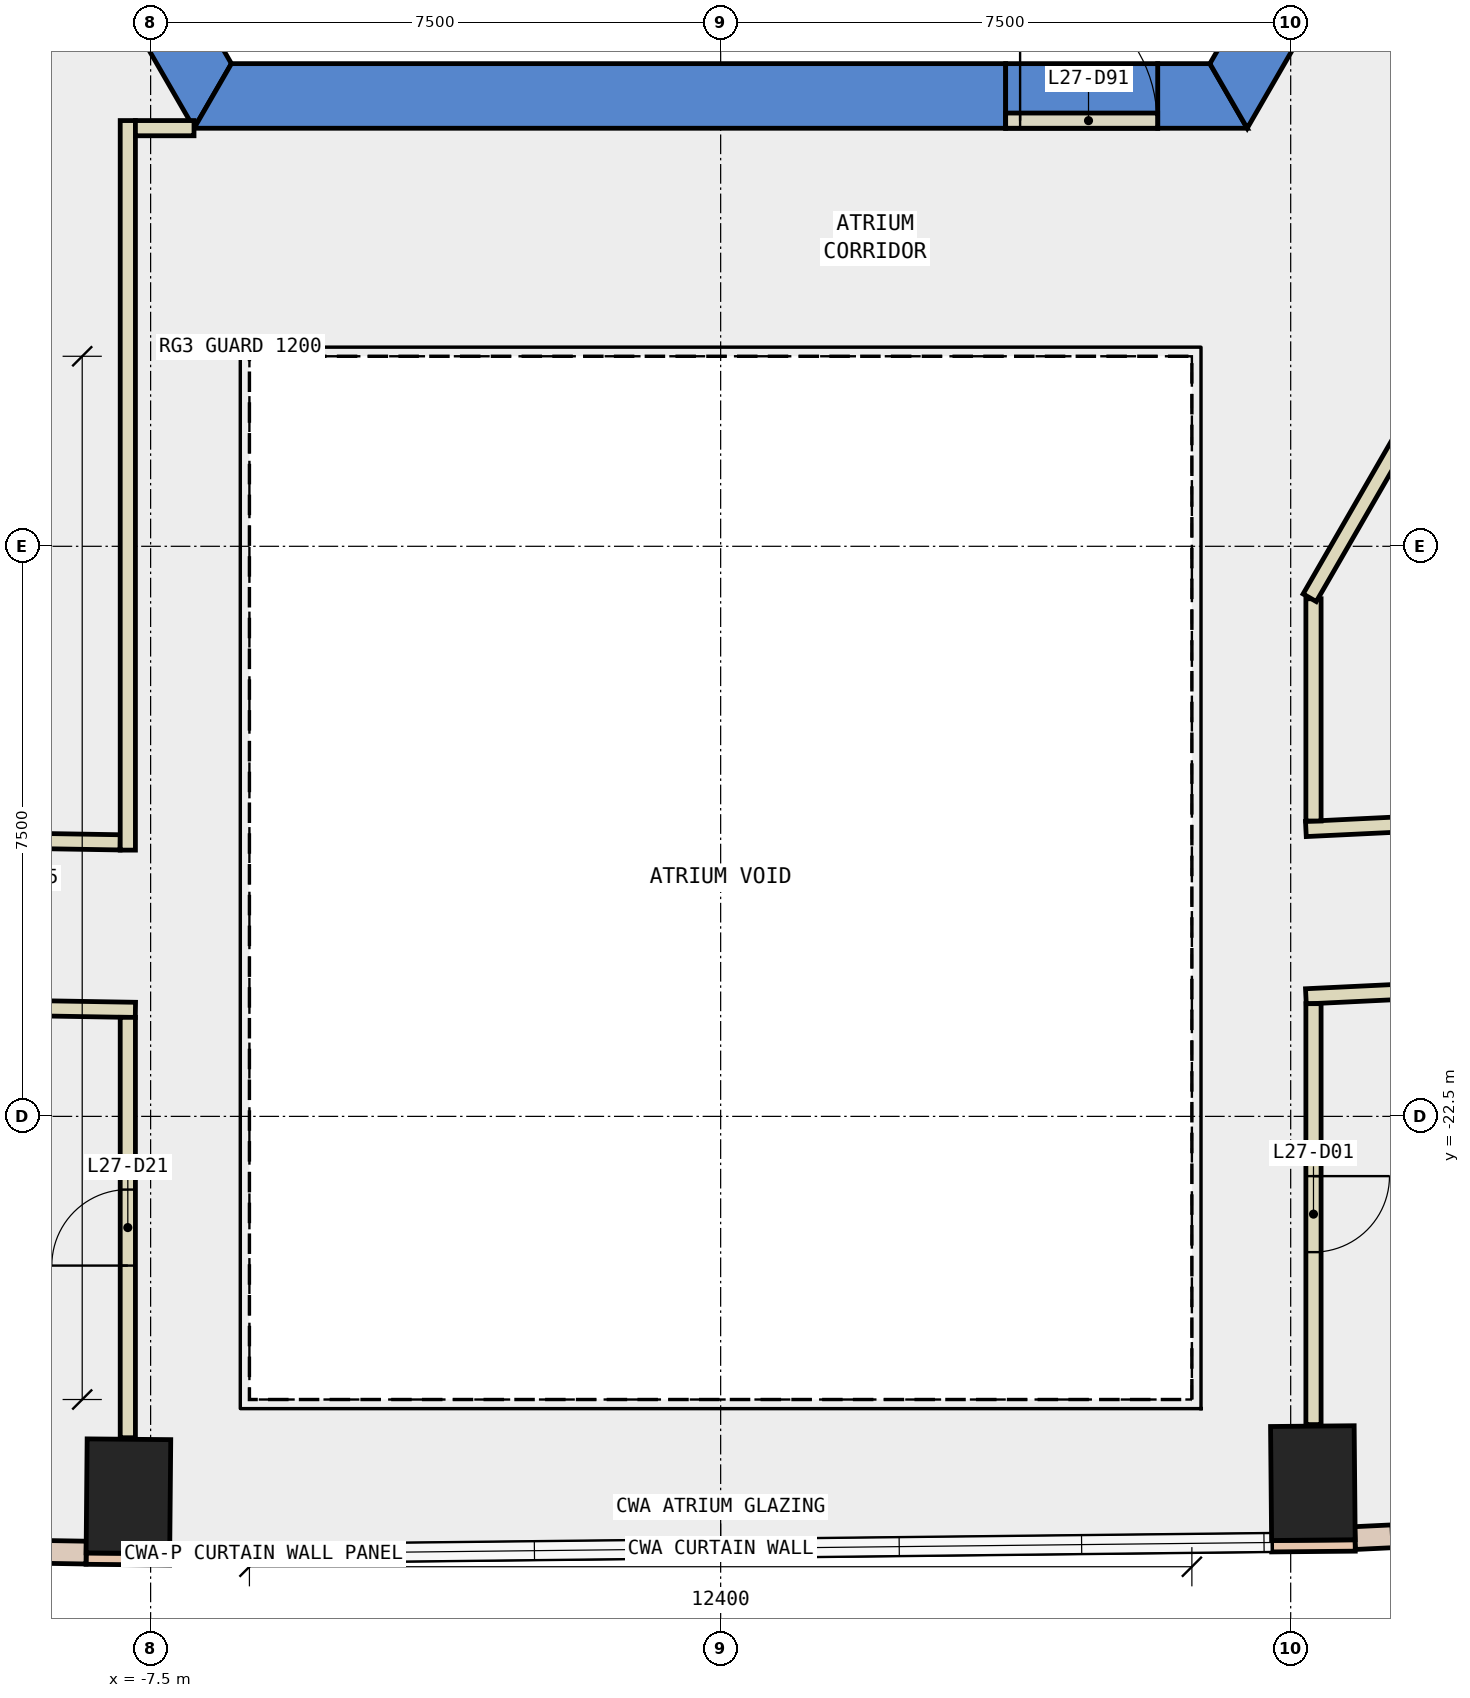
"""IFC4 building model, lengths in metres.
Left out: names, types, materials, properties, quantities, classifications, styles, units other than length and angle.
Written with IfcOpenShell. Run it as: python <this file> out.ifc"""

import sys

from ifc_helpers import new_model, si_unit, direction, frame, frame_2d, origin, origin_2d, place, context, subcontext, project, spatial, polyline, rectangle, outline, extrude, element, fill, save


model = new_model("IFC4")
c1 = context("Model", 3, precision=1e-05, world=origin(), true_north=direction((0.0, 1.0)))
c2 = subcontext(c1, "Body", "Model", "MODEL_VIEW")
j1 = project(units=[si_unit("LENGTHUNIT", "METRE"), si_unit("PLANEANGLEUNIT", "RADIAN")], contexts=[c1])
p1 = place(None, origin())
s1 = spatial("IfcSite", under=j1, at=p1, CompositionType="ELEMENT")
p2 = place(p1, origin())
s2 = spatial("IfcBuilding", under=s1, at=p2, CompositionType="ELEMENT")
p3 = place(p2, frame((0.0, 0.0, 124.4)))
s3 = spatial("IfcBuildingStorey", under=s2, at=p3, CompositionType="ELEMENT", Elevation=124.4)
for number, where, z_axis, x_axis in (
    (1, (-7.792, -27.498, -0.4), (0.0, 0.0, 1.0), (-1.0, 0.009, 0.0)),
    (2, (7.792, -27.325, -0.4), (0.0, 0.0, 1.0), (1.0, 0.009, 0.0)),
):
    element("IfcColumn", number, at=place(p3, frame(where, z_axis=z_axis, x_axis=x_axis)), inside=s3, PredefinedType="COLUMN", context=c2, shape_type="SweptSolid", body=[
        extrude(rectangle(XDim=1.1, YDim=1.5, at=origin_2d()), origin(), (0.0, 0.0, 1.0), 4.2),
    ])
p4 = place(p3, frame((0.0, 0.0, -0.4)))
e3 = element("IfcWall", 3, at=p4, inside=s3, PredefinedType="SHEAR", context=c2, shape_type="SweptSolid", body=[
    extrude(outline(polyline([(-13.856, 2.5), (-6.928, -9.5), (-6.437, -8.65), (-12.875, 2.5), (-13.856, 2.5)])), origin(), (0.0, 0.0, 1.0), 4.2),
])
p5 = place(p3, frame((0.0, 0.0, -0.4)))
e4 = element("IfcWall", 4, at=p5, inside=s3, PredefinedType="SHEAR", context=c2, shape_type="SweptSolid", body=[
    extrude(outline(polyline([(3.75, -9.5), (3.75, -8.65), (-6.437, -8.65), (-6.928, -9.5), (3.75, -9.5)])), origin(), (0.0, 0.0, 1.0), 4.2),
])
p6 = place(p3, frame((0.0, 0.0, -0.4)))
e5 = element("IfcWall", 5, at=p6, inside=s3, PredefinedType="SHEAR", context=c2, shape_type="SweptSolid", body=[
    extrude(outline(polyline([(5.75, -8.65), (5.75, -9.5), (6.928, -9.5), (6.437, -8.65), (5.75, -8.65)])), origin(), (0.0, 0.0, 1.0), 4.2),
])
p7 = place(p3, frame((0.0, 0.0, 3.6)))
e6 = element("IfcWall", 6, at=p7, inside=s3, PredefinedType="SHEAR", context=c2, shape_type="SweptSolid", body=[
    extrude(outline(polyline([(5.75, -9.5), (5.75, -8.65), (3.75, -8.65), (3.75, -9.5), (5.75, -9.5)])), origin(), (0.0, 0.0, 1.0), 0.2),
])
p8 = place(p3, frame((0.0, 0.0, -0.4)))
e7 = element("IfcWall", 7, at=p8, inside=s3, PredefinedType="SHEAR", context=c2, shape_type="SweptSolid", body=[
    extrude(outline(polyline([(8.117, -7.44), (7.381, -7.015), (6.437, -8.65), (6.928, -9.5), (8.117, -7.44)])), origin(), (0.0, 0.0, 1.0), 4.2),
])
for number, where, z_axis, x_axis in (
    (8, (-8.349, -28.318, 0.0), (0.0, 0.0, 1.0), (1.0, -0.009, 0.0)),
    (9, (7.249, -28.155, 0.0), (0.0, 0.0, 1.0), (1.0, 0.009, 0.0)),
):
    element("IfcWall", number, at=place(p3, frame(where, z_axis=z_axis, x_axis=x_axis)), inside=s3, PredefinedType="STANDARD", context=c2, shape_type="SweptSolid", body=[
        extrude(rectangle(XDim=1.1, YDim=0.15, at=frame_2d((0.55, 0.0))), origin(), (0.0, 0.0, 1.0), 3.8),
    ])
p9 = place(p3, frame((-14.242, -28.141, 0.0), z_axis=(0.0, 0.0, 1.0), x_axis=(0.999862081538, -0.016607766328, 0.0)))
e10 = element("IfcWall", 10, at=p9, inside=s3, PredefinedType="STANDARD", context=c2, shape_type="SweptSolid", body=[
    extrude(rectangle(XDim=5.895, YDim=0.3, at=frame_2d((2.947, 0.0))), origin(), (0.0, 0.0, 1.0), 3.8),
])
p10 = place(p9, frame((0.474, 0.0, 0.9)))
e11 = element("IfcOpeningElement", 11, at=p10, cuts=e10, PredefinedType="OPENING", context=c2, shape_type="SweptSolid", body=[
    extrude(rectangle(XDim=2.0, YDim=2.6, at=frame_2d((1.0, 1.3))), frame((0.0, 0.16, 0.0), z_axis=(0.0, -1.0, 0.0), x_axis=(1.0, 0.0, 0.0)), (0.0, 0.0, 1.0), 0.32),
])
p11 = place(p9, frame((3.421, 0.0, 0.9)))
e12 = element("IfcOpeningElement", 12, at=p11, cuts=e10, PredefinedType="OPENING", context=c2, shape_type="SweptSolid", body=[
    extrude(rectangle(XDim=2.0, YDim=2.6, at=frame_2d((1.0, 1.3))), frame((0.0, 0.16, 0.0), z_axis=(0.0, -1.0, 0.0), x_axis=(1.0, 0.0, 0.0)), (0.0, 0.0, 1.0), 0.32),
])
p12 = place(p3, frame((8.347, -28.048, 0.0), z_axis=(0.0, 0.0, 1.0), x_axis=(0.998840459798, 0.048142869367, 0.0)))
e13 = element("IfcWall", 13, at=p12, inside=s3, PredefinedType="STANDARD", context=c2, shape_type="SweptSolid", body=[
    extrude(rectangle(XDim=5.903, YDim=0.3, at=frame_2d((2.951, 0.0))), origin(), (0.0, 0.0, 1.0), 3.8),
])
p13 = place(p12, frame((0.476, 0.0, 0.9)))
e14 = element("IfcOpeningElement", 14, at=p13, cuts=e13, PredefinedType="OPENING", context=c2, shape_type="SweptSolid", body=[
    extrude(rectangle(XDim=2.0, YDim=2.6, at=frame_2d((1.0, 1.3))), frame((0.0, 0.16, 0.0), z_axis=(0.0, -1.0, 0.0), x_axis=(1.0, 0.0, 0.0)), (0.0, 0.0, 1.0), 0.32),
])
p14 = place(p12, frame((3.427, 0.0, 0.9)))
e15 = element("IfcOpeningElement", 15, at=p14, cuts=e13, PredefinedType="OPENING", context=c2, shape_type="SweptSolid", body=[
    extrude(rectangle(XDim=2.0, YDim=2.6, at=frame_2d((1.0, 1.3))), frame((0.0, 0.16, 0.0), z_axis=(0.0, -1.0, 0.0), x_axis=(1.0, 0.0, 0.0)), (0.0, 0.0, 1.0), 0.32),
])
p15 = place(p3, frame((7.7, -18.719, 0.0), z_axis=(0.0, 0.0, 1.0), x_axis=(0.998829118209, 0.048377604502, 0.0)))
e16 = element("IfcWall", 16, at=p15, inside=s3, PredefinedType="PARTITIONING", context=c2, shape_type="SweptSolid", body=[
    extrude(rectangle(XDim=6.596, YDim=0.2, at=frame_2d((3.298, 0.0))), origin(), (0.0, 0.0, 1.0), 3.8),
])
p16 = place(p3, frame((-14.589, -18.784, 0.0), z_axis=(0.0, 0.0, 1.0), x_axis=(0.999862141497, -0.016604156151, 0.0)))
e17 = element("IfcWall", 17, at=p16, inside=s3, PredefinedType="PARTITIONING", context=c2, shape_type="SweptSolid", body=[
    extrude(rectangle(XDim=6.69, YDim=0.2, at=frame_2d((3.345, 0.0))), origin(), (0.0, 0.0, 1.0), 3.8),
])
p17 = place(p3, frame((14.481, -20.594, 0.0), z_axis=(0.0, 0.0, 1.0), x_axis=(-0.998839976403, -0.048152897512, 0.0)))
e18 = element("IfcWall", 18, at=p17, inside=s3, PredefinedType="PARTITIONING", context=c2, shape_type="SweptSolid", body=[
    extrude(rectangle(XDim=6.789, YDim=0.2, at=frame_2d((3.395, 0.0))), origin(), (0.0, 0.0, 1.0), 3.8),
])
p18 = place(p3, frame((-7.7, -21.099, 0.0), z_axis=(0.0, 0.0, 1.0), x_axis=(-0.999861998162, 0.016612785183, 0.0)))
e19 = element("IfcWall", 19, at=p18, inside=s3, PredefinedType="PARTITIONING", context=c2, shape_type="SweptSolid", body=[
    extrude(rectangle(XDim=6.863, YDim=0.2, at=frame_2d((3.432, 0.0))), origin(), (0.0, 0.0, 1.0), 3.8),
])
p19 = place(p3, frame((7.8, -15.69, 0.0), z_axis=(0.0, 0.0, 1.0), x_axis=(0.0, -1.0, 0.0)))
e20 = element("IfcWall", 20, at=p19, inside=s3, PredefinedType="PARTITIONING", context=c2, shape_type="SweptSolid", body=[
    extrude(rectangle(XDim=2.924, YDim=0.2, at=frame_2d((1.462, 0.0))), origin(), (0.0, 0.0, 1.0), 3.8),
])
p20 = place(p3, frame((-7.8, -18.997, 0.0), z_axis=(0.0, 0.0, 1.0), x_axis=(0.0, 1.0, 0.0)))
e21 = element("IfcWall", 21, at=p20, inside=s3, PredefinedType="PARTITIONING", context=c2, shape_type="SweptSolid", body=[
    extrude(rectangle(XDim=9.598, YDim=0.2, at=frame_2d((4.799, 0.0))), origin(), (0.0, 0.0, 1.0), 3.8),
])
p21 = place(p3, frame((-7.7, -9.499, 0.0), z_axis=(0.0, 0.0, 1.0), x_axis=(1.0, 0.0, 0.0)))
e22 = element("IfcWall", 22, at=p21, inside=s3, PredefinedType="PARTITIONING", context=c2, shape_type="SweptSolid", body=[
    extrude(rectangle(XDim=0.771, YDim=0.2, at=frame_2d((0.385, 0.0))), origin(), (0.0, 0.0, 1.0), 3.8),
])
p22 = place(p3, frame((7.8, -21.017, 0.0), z_axis=(0.0, 0.0, 1.0), x_axis=(0.0, -1.0, 0.0)))
e23 = element("IfcWall", 23, at=p22, inside=s3, PredefinedType="PARTITIONING", context=c2, shape_type="SweptSolid", body=[
    extrude(rectangle(XDim=5.538, YDim=0.2, at=frame_2d((2.769, 0.0))), origin(), (0.0, 0.0, 1.0), 3.8),
])
p23 = place(p22, frame((2.269, 0.0, 0.0)))
e24 = element("IfcOpeningElement", 24, at=p23, cuts=e23, PredefinedType="OPENING", context=c2, shape_type="SweptSolid", body=[
    extrude(rectangle(XDim=1.0, YDim=2.1, at=frame_2d((0.5, 1.05))), frame((0.0, 0.11, 0.0), z_axis=(0.0, -1.0, 0.0), x_axis=(1.0, 0.0, 0.0)), (0.0, 0.0, 1.0), 0.22),
])
p24 = place(p3, frame((-7.8, -26.728, 0.0), z_axis=(0.0, 0.0, 1.0), x_axis=(0.0, 1.0, 0.0)))
e25 = element("IfcWall", 25, at=p24, inside=s3, PredefinedType="PARTITIONING", context=c2, shape_type="SweptSolid", body=[
    extrude(rectangle(XDim=5.531, YDim=0.2, at=frame_2d((2.766, 0.0))), origin(), (0.0, 0.0, 1.0), 3.8),
])
p25 = place(p24, frame((2.265, 0.0, 0.0)))
e26 = element("IfcOpeningElement", 26, at=p25, cuts=e25, PredefinedType="OPENING", context=c2, shape_type="SweptSolid", body=[
    extrude(rectangle(XDim=1.0, YDim=2.1, at=frame_2d((0.5, 1.05))), frame((0.0, 0.11, 0.0), z_axis=(0.0, -1.0, 0.0), x_axis=(1.0, 0.0, 0.0)), (0.0, 0.0, 1.0), 0.22),
])
p26 = place(p3, frame((3.75, -9.4, 0.0), z_axis=(0.0, 0.0, 1.0), x_axis=(1.0, 0.0, 0.0)))
e27 = element("IfcWall", 27, at=p26, inside=s3, PredefinedType="PARTITIONING", context=c2, shape_type="SweptSolid", body=[
    extrude(rectangle(XDim=2.0, YDim=0.2, at=frame_2d((1.0, 0.0))), origin(), (0.0, 0.0, 1.0), 2.4),
])
p27 = place(p26, frame((0.19, 0.0, 0.0)))
e28 = element("IfcOpeningElement", 28, at=p27, cuts=e27, PredefinedType="OPENING", context=c2, shape_type="SweptSolid", body=[
    extrude(rectangle(XDim=1.8, YDim=2.1, at=frame_2d((0.9, 1.05))), frame((0.0, 0.11, 0.0), z_axis=(0.0, -1.0, 0.0), x_axis=(1.0, 0.0, 0.0)), (0.0, 0.0, 1.0), 0.22),
])
p28 = place(p3, frame((12.401, -7.621, 0.0), z_axis=(0.0, 0.0, 1.0), x_axis=(-0.499983724212, -0.866034800411, 0.0)))
e29 = element("IfcWall", 29, at=p28, inside=s3, PredefinedType="PARTITIONING", context=c2, shape_type="SweptSolid", body=[
    extrude(rectangle(XDim=9.302, YDim=0.2, at=frame_2d((4.651, 0.0))), origin(), (0.0, 0.0, 1.0), 3.8),
])
p29 = place(p28, frame((0.231, 0.0, 0.0)))
e30 = element("IfcOpeningElement", 30, at=p29, cuts=e29, PredefinedType="OPENING", context=c2, shape_type="SweptSolid", body=[
    extrude(rectangle(XDim=1.0, YDim=2.1, at=frame_2d((0.5, 1.05))), frame((0.0, 0.11, 0.0), z_axis=(0.0, -1.0, 0.0), x_axis=(1.0, 0.0, 0.0)), (0.0, 0.0, 1.0), 0.22),
])
p30 = place(p28, frame((1.331, 0.0, 0.0)))
e31 = element("IfcOpeningElement", 31, at=p30, cuts=e29, PredefinedType="OPENING", context=c2, shape_type="SweptSolid", body=[
    extrude(rectangle(XDim=1.0, YDim=2.1, at=frame_2d((0.5, 1.05))), frame((0.0, 0.11, 0.0), z_axis=(0.0, -1.0, 0.0), x_axis=(1.0, 0.0, 0.0)), (0.0, 0.0, 1.0), 0.22),
])
p31 = place(p23, origin())
e32 = element("IfcDoor", 32, at=p31, inside=s3, OperationType="SINGLE_SWING_LEFT", PredefinedType="DOOR", context=c2, shape_type="SweptSolid", body=[
    extrude(rectangle(XDim=1.0, YDim=2.1, at=frame_2d((0.5, 1.05))), frame((0.0, 0.025, 0.0), z_axis=(0.0, -1.0, 0.0), x_axis=(1.0, 0.0, 0.0)), (0.0, 0.0, 1.0), 0.05),
])
fill(e24, e32)
p32 = place(p25, origin())
e33 = element("IfcDoor", 33, at=p32, inside=s3, OperationType="SINGLE_SWING_LEFT", PredefinedType="DOOR", context=c2, shape_type="SweptSolid", body=[
    extrude(rectangle(XDim=1.0, YDim=2.1, at=frame_2d((0.5, 1.05))), frame((0.0, 0.025, 0.0), z_axis=(0.0, -1.0, 0.0), x_axis=(1.0, 0.0, 0.0)), (0.0, 0.0, 1.0), 0.05),
])
fill(e26, e33)
p33 = place(p27, origin())
e34 = element("IfcDoor", 34, at=p33, inside=s3, OperationType="DOUBLE_DOOR_SINGLE_SWING", PredefinedType="DOOR", context=c2, shape_type="SweptSolid", body=[
    extrude(rectangle(XDim=1.8, YDim=2.1, at=frame_2d((0.9, 1.05))), frame((0.0, 0.025, 0.0), z_axis=(0.0, -1.0, 0.0), x_axis=(1.0, 0.0, 0.0)), (0.0, 0.0, 1.0), 0.05),
])
fill(e28, e34)
save(model, sys.argv[1])
